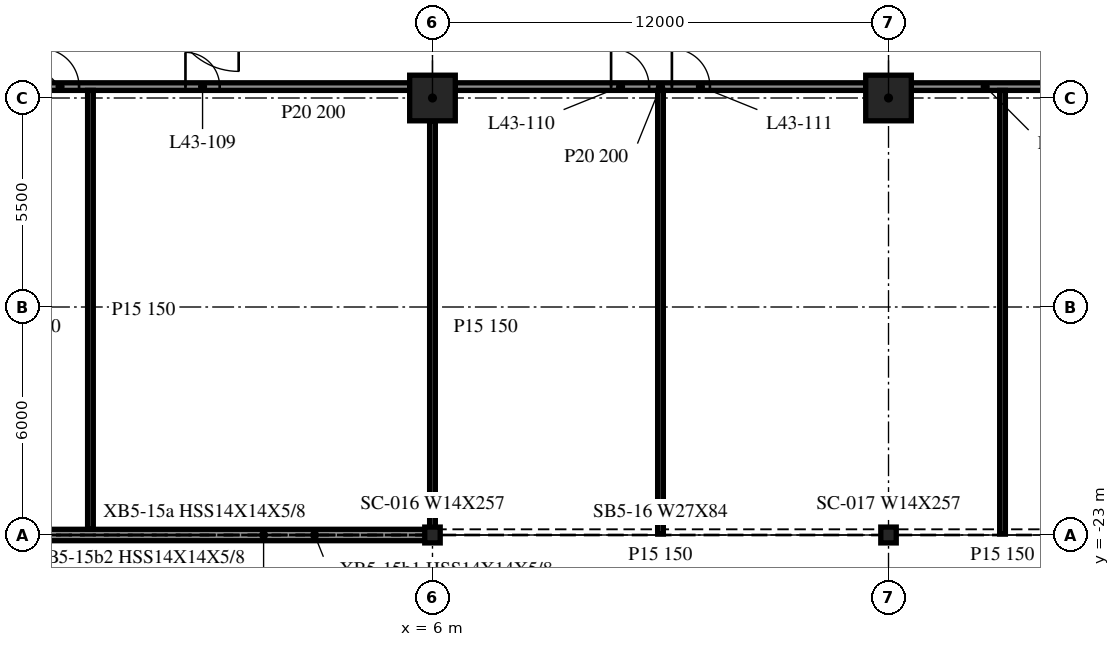
"""IFC4 building model, lengths in metres.
Left out: names, types, materials, properties, quantities, classifications, styles, units other than length and angle.
Written with IfcOpenShell. Run it as: python <this file> out.ifc"""

import sys

from ifc_helpers import new_model, si_unit, direction, frame, frame_2d, origin, origin_2d, place, context, subcontext, project, spatial, rectangle, i_section, extrude, element, fill, save


model = new_model("IFC4")
c1 = context("Model", 3, precision=1e-05, world=origin(), true_north=direction((0.0, 1.0)))
c2 = subcontext(c1, "Body", "Model", "MODEL_VIEW")
j1 = project(units=[si_unit("LENGTHUNIT", "METRE"), si_unit("PLANEANGLEUNIT", "RADIAN")], contexts=[c1])
p1 = place(None, origin())
s1 = spatial("IfcSite", under=j1, at=p1, CompositionType="ELEMENT")
p2 = place(p1, origin())
s2 = spatial("IfcBuilding", under=s1, at=p2, CompositionType="ELEMENT")
p3 = place(p2, frame((0.0, 0.0, 182.0)))
s3 = spatial("IfcBuildingStorey", under=s2, at=p3, CompositionType="ELEMENT", Elevation=182.0)
for number, where, z_axis, x_axis in (
    (1, (6.0, -11.5, -0.34), (0.0, 0.0, 1.0), (1.0, 0.0, 0.0)),
    (2, (18.0, -11.5, -0.34), (0.0, 0.0, 1.0), (1.0, 0.0, 0.0)),
):
    element("IfcColumn", number, at=place(p3, frame(where, z_axis=z_axis, x_axis=x_axis)), inside=s3, PredefinedType="COLUMN", context=c2, shape_type="SweptSolid", body=[
        extrude(rectangle(XDim=1.2, YDim=1.2, at=origin_2d()), origin(), (0.0, 0.0, 1.0), 3.8),
    ])
for number, where, z_axis, x_axis in (
    (3, (6.0, -23.0, -0.34), (0.0, 0.0, 1.0), (1.0, 0.0, 0.0)),
    (4, (18.0, -23.0, -0.34), (0.0, 0.0, 1.0), (1.0, 0.0, 0.0)),
):
    element("IfcColumn", number, at=place(p3, frame(where, z_axis=z_axis, x_axis=x_axis)), inside=s3, PredefinedType="COLUMN", context=c2, shape_type="SweptSolid", body=[
        extrude(i_section(OverallWidth=0.406, OverallDepth=0.417, WebThickness=0.03, FlangeThickness=0.048, at=origin_2d()), origin(), (0.0, 0.0, 1.0), 3.8),
    ])
p4 = place(p3, frame((-5.985, -23.0, 0.0), z_axis=(0.0, 0.0, 1.0), x_axis=(1.0, 0.0, 0.0)))
e5 = element("IfcWall", 5, at=p4, inside=s3, PredefinedType="NOTDEFINED", context=c2, shape_type="SweptSolid", body=[
    extrude(rectangle(XDim=11.97, YDim=0.3, at=frame_2d((5.985, 0.0))), origin(), (0.0, 0.0, 1.0), 2.782),
])
p5 = place(p3, frame((-5.4, -11.2, 0.0), z_axis=(0.0, 0.0, 1.0), x_axis=(1.0, 0.0, 0.0)))
e6 = element("IfcWall", 6, at=p5, inside=s3, PredefinedType="PARTITIONING", context=c2, shape_type="SweptSolid", body=[
    extrude(rectangle(XDim=10.8, YDim=0.2, at=frame_2d((5.4, 0.0))), origin(), (0.0, 0.0, 1.0), 3.46),
])
p6 = place(p5, frame((1.1, 0.0, 0.0)))
e7 = element("IfcOpeningElement", 7, at=p6, cuts=e6, PredefinedType="OPENING", context=c2, shape_type="SweptSolid", body=[
    extrude(rectangle(XDim=1.0, YDim=2.1, at=frame_2d((0.5, 1.05))), frame((0.0, 0.11, 0.0), z_axis=(0.0, -1.0, 0.0), x_axis=(1.0, 0.0, 0.0)), (0.0, 0.0, 1.0), 0.22),
])
p7 = place(p5, frame((4.9, 0.0, 0.0)))
e8 = element("IfcOpeningElement", 8, at=p7, cuts=e6, PredefinedType="OPENING", context=c2, shape_type="SweptSolid", body=[
    extrude(rectangle(XDim=0.9, YDim=2.1, at=frame_2d((0.45, 1.05))), frame((0.0, 0.11, 0.0), z_axis=(0.0, -1.0, 0.0), x_axis=(1.0, 0.0, 0.0)), (0.0, 0.0, 1.0), 0.22),
])
p8 = place(p3, frame((6.6, -11.2, 0.0), z_axis=(0.0, 0.0, 1.0), x_axis=(1.0, 0.0, 0.0)))
e9 = element("IfcWall", 9, at=p8, inside=s3, PredefinedType="PARTITIONING", context=c2, shape_type="SweptSolid", body=[
    extrude(rectangle(XDim=10.8, YDim=0.2, at=frame_2d((5.4, 0.0))), origin(), (0.0, 0.0, 1.0), 3.46),
])
p9 = place(p8, frame((4.1, 0.0, 0.0)))
e10 = element("IfcOpeningElement", 10, at=p9, cuts=e9, PredefinedType="OPENING", context=c2, shape_type="SweptSolid", body=[
    extrude(rectangle(XDim=1.0, YDim=2.1, at=frame_2d((0.5, 1.05))), frame((0.0, 0.11, 0.0), z_axis=(0.0, -1.0, 0.0), x_axis=(1.0, 0.0, 0.0)), (0.0, 0.0, 1.0), 0.22),
])
p10 = place(p8, frame((5.7, 0.0, 0.0)))
e11 = element("IfcOpeningElement", 11, at=p10, cuts=e9, PredefinedType="OPENING", context=c2, shape_type="SweptSolid", body=[
    extrude(rectangle(XDim=1.0, YDim=2.1, at=frame_2d((0.5, 1.05))), frame((0.0, 0.11, 0.0), z_axis=(0.0, -1.0, 0.0), x_axis=(1.0, 0.0, 0.0)), (0.0, 0.0, 1.0), 0.22),
])
p11 = place(p3, frame((18.6, -11.2, 0.0), z_axis=(0.0, 0.0, 1.0), x_axis=(1.0, 0.0, 0.0)))
e12 = element("IfcWall", 12, at=p11, inside=s3, PredefinedType="PARTITIONING", context=c2, shape_type="SweptSolid", body=[
    extrude(rectangle(XDim=10.8, YDim=0.2, at=frame_2d((5.4, 0.0))), origin(), (0.0, 0.0, 1.0), 3.46),
])
p12 = place(p11, frame((4.1, 0.0, 0.0)))
e13 = element("IfcOpeningElement", 13, at=p12, cuts=e12, PredefinedType="OPENING", context=c2, shape_type="SweptSolid", body=[
    extrude(rectangle(XDim=1.0, YDim=2.1, at=frame_2d((0.5, 1.05))), frame((0.0, 0.11, 0.0), z_axis=(0.0, -1.0, 0.0), x_axis=(1.0, 0.0, 0.0)), (0.0, 0.0, 1.0), 0.22),
])
p13 = place(p11, frame((5.7, 0.0, 0.0)))
e14 = element("IfcOpeningElement", 14, at=p13, cuts=e12, PredefinedType="OPENING", context=c2, shape_type="SweptSolid", body=[
    extrude(rectangle(XDim=0.9, YDim=2.1, at=frame_2d((0.45, 1.05))), frame((0.0, 0.11, 0.0), z_axis=(0.0, -1.0, 0.0), x_axis=(1.0, 0.0, 0.0)), (0.0, 0.0, 1.0), 0.22),
])
p14 = place(p3, frame((-3.0, -22.85, 0.0), z_axis=(0.0, 0.0, 1.0), x_axis=(0.0, 1.0, 0.0)))
e15 = element("IfcWall", 15, at=p14, inside=s3, PredefinedType="PARTITIONING", context=c2, shape_type="SweptSolid", body=[
    extrude(rectangle(XDim=11.55, YDim=0.15, at=frame_2d((5.775, 0.0))), origin(), (0.0, 0.0, 1.0), 3.46),
])
p15 = place(p3, frame((6.0, -22.975, 0.0), z_axis=(0.0, 0.0, 1.0), x_axis=(0.0, 1.0, 0.0)))
e16 = element("IfcWall", 16, at=p15, inside=s3, PredefinedType="PARTITIONING", context=c2, shape_type="SweptSolid", body=[
    extrude(rectangle(XDim=10.875, YDim=0.15, at=frame_2d((5.438, 0.0))), origin(), (0.0, 0.0, 1.0), 3.46),
])
for number, where, z_axis, x_axis in (
    (17, (12.0, -22.975, 0.0), (0.0, 0.0, 1.0), (0.0, 1.0, 0.0)),
    (18, (21.0, -22.975, 0.0), (0.0, 0.0, 1.0), (0.0, 1.0, 0.0)),
):
    element("IfcWall", number, at=place(p3, frame(where, z_axis=z_axis, x_axis=x_axis)), inside=s3, PredefinedType="PARTITIONING", context=c2, shape_type="SweptSolid", body=[
        extrude(rectangle(XDim=11.675, YDim=0.15, at=frame_2d((5.837, 0.0))), origin(), (0.0, 0.0, 1.0), 3.46),
    ])
p16 = place(p6, origin())
e19 = element("IfcDoor", 19, at=p16, inside=s3, OperationType="SINGLE_SWING_RIGHT", PredefinedType="DOOR", context=c2, shape_type="SweptSolid", body=[
    extrude(rectangle(XDim=1.0, YDim=2.1, at=frame_2d((0.5, 1.05))), frame((0.0, 0.025, 0.0), z_axis=(0.0, -1.0, 0.0), x_axis=(1.0, 0.0, 0.0)), (0.0, 0.0, 1.0), 0.05),
])
fill(e7, e19)
p17 = place(p7, origin())
e20 = element("IfcDoor", 20, at=p17, inside=s3, OperationType="SINGLE_SWING_RIGHT", PredefinedType="DOOR", context=c2, shape_type="SweptSolid", body=[
    extrude(rectangle(XDim=0.9, YDim=2.1, at=frame_2d((0.45, 1.05))), frame((0.0, 0.025, 0.0), z_axis=(0.0, -1.0, 0.0), x_axis=(1.0, 0.0, 0.0)), (0.0, 0.0, 1.0), 0.05),
])
fill(e8, e20)
p18 = place(p9, origin())
e21 = element("IfcDoor", 21, at=p18, inside=s3, OperationType="SINGLE_SWING_RIGHT", PredefinedType="DOOR", context=c2, shape_type="SweptSolid", body=[
    extrude(rectangle(XDim=1.0, YDim=2.1, at=frame_2d((0.5, 1.05))), frame((0.0, 0.025, 0.0), z_axis=(0.0, -1.0, 0.0), x_axis=(1.0, 0.0, 0.0)), (0.0, 0.0, 1.0), 0.05),
])
fill(e10, e21)
p19 = place(p10, origin())
e22 = element("IfcDoor", 22, at=p19, inside=s3, OperationType="SINGLE_SWING_LEFT", PredefinedType="DOOR", context=c2, shape_type="SweptSolid", body=[
    extrude(rectangle(XDim=1.0, YDim=2.1, at=frame_2d((0.5, 1.05))), frame((0.0, 0.025, 0.0), z_axis=(0.0, -1.0, 0.0), x_axis=(1.0, 0.0, 0.0)), (0.0, 0.0, 1.0), 0.05),
])
fill(e11, e22)
save(model, sys.argv[1])
